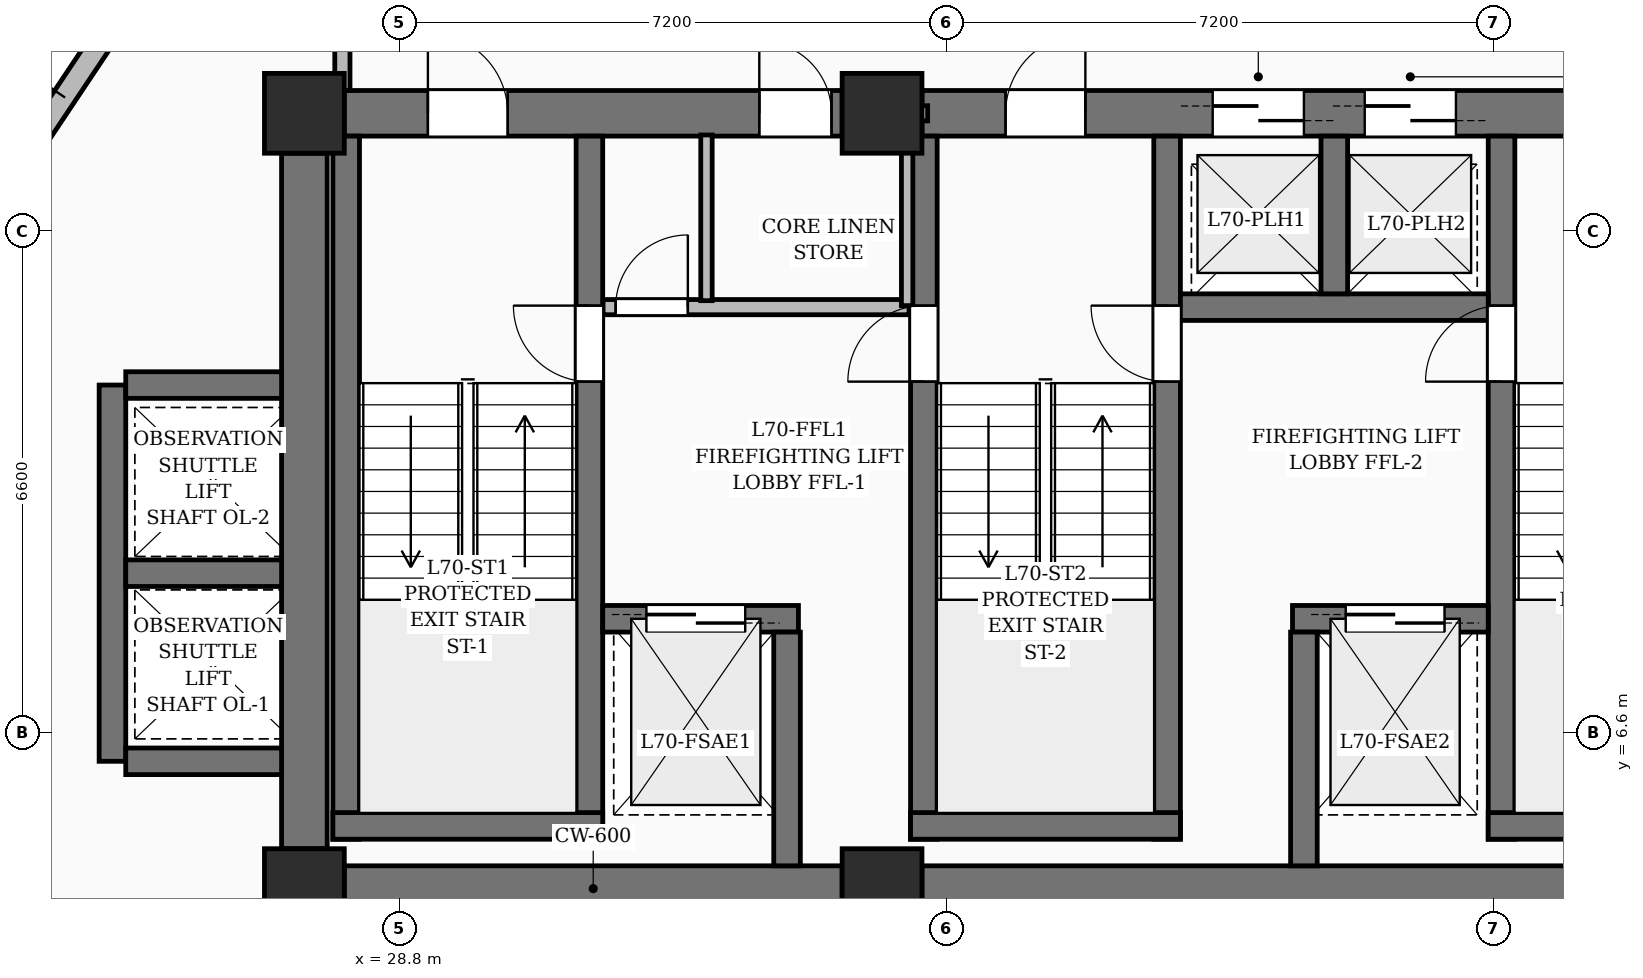
"""IFC4 building model, lengths in metres.
Left out: names, types, materials, properties, quantities, classifications, styles, units other than length and angle.
Written with IfcOpenShell. Run it as: python <this file> out.ifc"""

import sys

from ifc_helpers import new_model, si_unit, direction, frame, frame_2d, origin, origin_2d, place, context, subcontext, project, spatial, rectangle, extrude, element, fill, save


model = new_model("IFC4")
c1 = context("Model", 3, precision=1e-05, world=origin(), true_north=direction((0.0, 1.0)))
c2 = subcontext(c1, "Body", "Model", "MODEL_VIEW")
j1 = project(units=[si_unit("LENGTHUNIT", "METRE"), si_unit("PLANEANGLEUNIT", "RADIAN")], contexts=[c1])
p1 = place(None, origin())
s1 = spatial("IfcSite", under=j1, at=p1, CompositionType="ELEMENT")
p2 = place(p1, origin())
s2 = spatial("IfcBuilding", under=s1, at=p2, CompositionType="ELEMENT")
p3 = place(p2, frame((0.0, 0.0, 270.75)))
s3 = spatial("IfcBuildingStorey", under=s2, at=p3, CompositionType="ELEMENT", Elevation=270.75)
for number, where, z_axis, x_axis in (
    (1, (27.55, 4.55, 0.0), (0.0, 0.0, 1.0), (1.0, 0.0, 0.0)),
    (2, (35.15, 4.55, 0.0), (0.0, 0.0, 1.0), (1.0, 0.0, 0.0)),
    (3, (27.55, 14.75, 0.0), (0.0, 0.0, 1.0), (1.0, 0.0, 0.0)),
    (4, (35.15, 14.75, 0.0), (0.0, 0.0, 1.0), (1.0, 0.0, 0.0)),
):
    element("IfcColumn", number, at=place(p3, frame(where, z_axis=z_axis, x_axis=x_axis)), inside=s3, PredefinedType="COLUMN", context=c2, shape_type="SweptSolid", body=[
        extrude(rectangle(XDim=1.05, YDim=1.05, at=origin_2d()), origin(), (0.0, 0.0, 1.0), 3.75),
    ])
p4 = place(p3, frame((28.075, 4.55, 0.0), z_axis=(0.0, 0.0, 1.0), x_axis=(1.0, 0.0, 0.0)))
e5 = element("IfcWall", 5, at=p4, inside=s3, PredefinedType="SHEAR", context=c2, shape_type="SweptSolid", body=[
    extrude(rectangle(XDim=6.55, YDim=0.6, at=frame_2d((3.275, 0.0))), origin(), (0.0, 0.0, 1.0), 3.75),
])
p5 = place(p3, frame((35.675, 4.55, 0.0), z_axis=(0.0, 0.0, 1.0), x_axis=(1.0, 0.0, 0.0)))
e6 = element("IfcWall", 6, at=p5, inside=s3, PredefinedType="SHEAR", context=c2, shape_type="SweptSolid", body=[
    extrude(rectangle(XDim=10.85, YDim=0.6, at=frame_2d((5.425, 0.0))), origin(), (0.0, 0.0, 1.0), 3.75),
])
p6 = place(p3, frame((28.075, 14.75, 0.0), z_axis=(0.0, 0.0, 1.0), x_axis=(1.0, 0.0, 0.0)))
e7 = element("IfcWall", 7, at=p6, inside=s3, PredefinedType="SHEAR", context=c2, shape_type="SweptSolid", body=[
    extrude(rectangle(XDim=6.55, YDim=0.6, at=frame_2d((3.275, 0.0))), origin(), (0.0, 0.0, 1.0), 3.75),
])
p7 = place(p6, frame((1.1, 0.0, 0.0)))
e8 = element("IfcOpeningElement", 8, at=p7, cuts=e7, PredefinedType="OPENING", context=c2, shape_type="SweptSolid", body=[
    extrude(rectangle(XDim=1.05, YDim=2.15, at=frame_2d((0.525, 1.075))), frame((0.0, 0.31, 0.0), z_axis=(0.0, -1.0, 0.0), x_axis=(1.0, 0.0, 0.0)), (0.0, 0.0, 1.0), 0.62),
])
p8 = place(p6, frame((5.46, 0.0, 0.0)))
e9 = element("IfcOpeningElement", 9, at=p8, cuts=e7, PredefinedType="OPENING", context=c2, shape_type="SweptSolid", body=[
    extrude(rectangle(XDim=0.95, YDim=2.15, at=frame_2d((0.475, 1.075))), frame((0.0, 0.31, 0.0), z_axis=(0.0, -1.0, 0.0), x_axis=(1.0, 0.0, 0.0)), (0.0, 0.0, 1.0), 0.62),
])
p9 = place(p3, frame((35.675, 14.75, 0.0), z_axis=(0.0, 0.0, 1.0), x_axis=(1.0, 0.0, 0.0)))
e10 = element("IfcWall", 10, at=p9, inside=s3, PredefinedType="SHEAR", context=c2, shape_type="SweptSolid", body=[
    extrude(rectangle(XDim=10.85, YDim=0.6, at=frame_2d((5.425, 0.0))), origin(), (0.0, 0.0, 1.0), 3.75),
])
p10 = place(p9, frame((1.1, 0.0, 0.0)))
e11 = element("IfcOpeningElement", 11, at=p10, cuts=e10, PredefinedType="OPENING", context=c2, shape_type="SweptSolid", body=[
    extrude(rectangle(XDim=1.05, YDim=2.15, at=frame_2d((0.525, 1.075))), frame((0.0, 0.31, 0.0), z_axis=(0.0, -1.0, 0.0), x_axis=(1.0, 0.0, 0.0)), (0.0, 0.0, 1.0), 0.62),
])
p11 = place(p9, frame((8.7, 0.0, 0.0)))
e12 = element("IfcOpeningElement", 12, at=p11, cuts=e10, PredefinedType="OPENING", context=c2, shape_type="SweptSolid", body=[
    extrude(rectangle(XDim=1.05, YDim=2.15, at=frame_2d((0.525, 1.075))), frame((0.0, 0.31, 0.0), z_axis=(0.0, -1.0, 0.0), x_axis=(1.0, 0.0, 0.0)), (0.0, 0.0, 1.0), 0.62),
])
p12 = place(p9, frame((3.825, 0.0, 0.0)))
e13 = element("IfcOpeningElement", 13, at=p12, cuts=e10, PredefinedType="OPENING", context=c2, shape_type="SweptSolid", body=[
    extrude(rectangle(XDim=1.2, YDim=2.2, at=frame_2d((0.6, 1.1))), frame((0.0, 0.31, 0.0), z_axis=(0.0, -1.0, 0.0), x_axis=(1.0, 0.0, 0.0)), (0.0, 0.0, 1.0), 0.62),
])
p13 = place(p9, frame((5.825, 0.0, 0.0)))
e14 = element("IfcOpeningElement", 14, at=p13, cuts=e10, PredefinedType="OPENING", context=c2, shape_type="SweptSolid", body=[
    extrude(rectangle(XDim=1.2, YDim=2.2, at=frame_2d((0.6, 1.1))), frame((0.0, 0.31, 0.0), z_axis=(0.0, -1.0, 0.0), x_axis=(1.0, 0.0, 0.0)), (0.0, 0.0, 1.0), 0.62),
])
p14 = place(p3, frame((27.55, 5.075, 0.0), z_axis=(0.0, 0.0, 1.0), x_axis=(0.0, 1.0, 0.0)))
e15 = element("IfcWall", 15, at=p14, inside=s3, PredefinedType="SHEAR", context=c2, shape_type="SweptSolid", body=[
    extrude(rectangle(XDim=9.15, YDim=0.6, at=frame_2d((4.575, 0.0))), origin(), (0.0, 0.0, 1.0), 3.75),
])
p15 = place(p3, frame((28.1, 5.2, 0.0), z_axis=(0.0, 0.0, 1.0), x_axis=(0.0, 1.0, 0.0)))
e16 = element("IfcWall", 16, at=p15, inside=s3, PredefinedType="SOLIDWALL", context=c2, shape_type="SweptSolid", body=[
    extrude(rectangle(XDim=9.25, YDim=0.35, at=frame_2d((4.625, 0.0))), origin(), (0.0, 0.0, 1.0), 3.75),
])
p16 = place(p3, frame((31.3, 5.2, 0.0), z_axis=(0.0, 0.0, 1.0), x_axis=(0.0, 1.0, 0.0)))
e17 = element("IfcWall", 17, at=p16, inside=s3, PredefinedType="SOLIDWALL", context=c2, shape_type="SweptSolid", body=[
    extrude(rectangle(XDim=9.25, YDim=0.35, at=frame_2d((4.625, 0.0))), origin(), (0.0, 0.0, 1.0), 3.75),
])
p17 = place(p16, frame((6.02, 0.0, 0.0)))
e18 = element("IfcOpeningElement", 18, at=p17, cuts=e17, PredefinedType="OPENING", context=c2, shape_type="SweptSolid", body=[
    extrude(rectangle(XDim=1.0, YDim=2.15, at=frame_2d((0.5, 1.075))), frame((0.0, 0.185, 0.0), z_axis=(0.0, -1.0, 0.0), x_axis=(1.0, 0.0, 0.0)), (0.0, 0.0, 1.0), 0.37),
])
p18 = place(p3, frame((27.925, 5.375, 0.0), z_axis=(0.0, 0.0, 1.0), x_axis=(1.0, 0.0, 0.0)))
e19 = element("IfcWall", 19, at=p18, inside=s3, PredefinedType="SOLIDWALL", context=c2, shape_type="SweptSolid", body=[
    extrude(rectangle(XDim=3.55, YDim=0.35, at=frame_2d((1.775, 0.0))), origin(), (0.0, 0.0, 1.0), 3.75),
])
p19 = place(p3, frame((35.7, 5.2, 0.0), z_axis=(0.0, 0.0, 1.0), x_axis=(0.0, 1.0, 0.0)))
e20 = element("IfcWall", 20, at=p19, inside=s3, PredefinedType="SOLIDWALL", context=c2, shape_type="SweptSolid", body=[
    extrude(rectangle(XDim=9.25, YDim=0.35, at=frame_2d((4.625, 0.0))), origin(), (0.0, 0.0, 1.0), 3.75),
])
p20 = place(p19, frame((6.02, 0.0, 0.0)))
e21 = element("IfcOpeningElement", 21, at=p20, cuts=e20, PredefinedType="OPENING", context=c2, shape_type="SweptSolid", body=[
    extrude(rectangle(XDim=1.0, YDim=2.15, at=frame_2d((0.5, 1.075))), frame((0.0, 0.185, 0.0), z_axis=(0.0, -1.0, 0.0), x_axis=(1.0, 0.0, 0.0)), (0.0, 0.0, 1.0), 0.37),
])
p21 = place(p3, frame((38.9, 5.2, 0.0), z_axis=(0.0, 0.0, 1.0), x_axis=(0.0, 1.0, 0.0)))
e22 = element("IfcWall", 22, at=p21, inside=s3, PredefinedType="SOLIDWALL", context=c2, shape_type="SweptSolid", body=[
    extrude(rectangle(XDim=9.25, YDim=0.35, at=frame_2d((4.625, 0.0))), origin(), (0.0, 0.0, 1.0), 3.75),
])
p22 = place(p21, frame((6.02, 0.0, 0.0)))
e23 = element("IfcOpeningElement", 23, at=p22, cuts=e22, PredefinedType="OPENING", context=c2, shape_type="SweptSolid", body=[
    extrude(rectangle(XDim=1.0, YDim=2.15, at=frame_2d((0.5, 1.075))), frame((0.0, 0.185, 0.0), z_axis=(0.0, -1.0, 0.0), x_axis=(1.0, 0.0, 0.0)), (0.0, 0.0, 1.0), 0.37),
])
p23 = place(p3, frame((35.525, 5.375, 0.0), z_axis=(0.0, 0.0, 1.0), x_axis=(1.0, 0.0, 0.0)))
e24 = element("IfcWall", 24, at=p23, inside=s3, PredefinedType="SOLIDWALL", context=c2, shape_type="SweptSolid", body=[
    extrude(rectangle(XDim=3.55, YDim=0.35, at=frame_2d((1.775, 0.0))), origin(), (0.0, 0.0, 1.0), 3.75),
])
p24 = place(p3, frame((43.3, 5.2, 0.0), z_axis=(0.0, 0.0, 1.0), x_axis=(0.0, 1.0, 0.0)))
e25 = element("IfcWall", 25, at=p24, inside=s3, PredefinedType="SOLIDWALL", context=c2, shape_type="SweptSolid", body=[
    extrude(rectangle(XDim=9.25, YDim=0.35, at=frame_2d((4.625, 0.0))), origin(), (0.0, 0.0, 1.0), 3.75),
])
p25 = place(p24, frame((6.02, 0.0, 0.0)))
e26 = element("IfcOpeningElement", 26, at=p25, cuts=e25, PredefinedType="OPENING", context=c2, shape_type="SweptSolid", body=[
    extrude(rectangle(XDim=1.0, YDim=2.15, at=frame_2d((0.5, 1.075))), frame((0.0, 0.185, 0.0), z_axis=(0.0, -1.0, 0.0), x_axis=(1.0, 0.0, 0.0)), (0.0, 0.0, 1.0), 0.37),
])
p26 = place(p3, frame((43.125, 5.375, 0.0), z_axis=(0.0, 0.0, 1.0), x_axis=(1.0, 0.0, 0.0)))
e27 = element("IfcWall", 27, at=p26, inside=s3, PredefinedType="SOLIDWALL", context=c2, shape_type="SweptSolid", body=[
    extrude(rectangle(XDim=3.55, YDim=0.35, at=frame_2d((1.775, 0.0))), origin(), (0.0, 0.0, 1.0), 3.75),
])
p27 = place(p3, frame((31.475, 8.1, 0.0), z_axis=(0.0, 0.0, 1.0), x_axis=(1.0, 0.0, 0.0)))
e28 = element("IfcWall", 28, at=p27, inside=s3, PredefinedType="SOLIDWALL", context=c2, shape_type="SweptSolid", body=[
    extrude(rectangle(XDim=2.575, YDim=0.35, at=frame_2d((1.288, 0.0))), origin(), (0.0, 0.0, 1.0), 3.75),
])
p28 = place(p27, frame((0.575, 0.0, 0.0)))
e29 = element("IfcOpeningElement", 29, at=p28, cuts=e28, PredefinedType="OPENING", context=c2, shape_type="SweptSolid", body=[
    extrude(rectangle(XDim=1.3, YDim=2.25, at=frame_2d((0.65, 1.125))), frame((0.0, 0.185, 0.0), z_axis=(0.0, -1.0, 0.0), x_axis=(1.0, 0.0, 0.0)), (0.0, 0.0, 1.0), 0.37),
])
p29 = place(p3, frame((40.55, 8.1, 0.0), z_axis=(0.0, 0.0, 1.0), x_axis=(1.0, 0.0, 0.0)))
e30 = element("IfcWall", 30, at=p29, inside=s3, PredefinedType="SOLIDWALL", context=c2, shape_type="SweptSolid", body=[
    extrude(rectangle(XDim=2.575, YDim=0.35, at=frame_2d((1.288, 0.0))), origin(), (0.0, 0.0, 1.0), 3.75),
])
p30 = place(p29, frame((0.7, 0.0, 0.0)))
e31 = element("IfcOpeningElement", 31, at=p30, cuts=e30, PredefinedType="OPENING", context=c2, shape_type="SweptSolid", body=[
    extrude(rectangle(XDim=1.3, YDim=2.25, at=frame_2d((0.65, 1.125))), frame((0.0, 0.185, 0.0), z_axis=(0.0, -1.0, 0.0), x_axis=(1.0, 0.0, 0.0)), (0.0, 0.0, 1.0), 0.37),
])
for number, where, z_axis, x_axis in (
    (32, (33.9, 4.85, 0.0), (0.0, 0.0, 1.0), (0.0, 1.0, 0.0)),
    (33, (40.7, 4.85, 0.0), (0.0, 0.0, 1.0), (0.0, 1.0, 0.0)),
):
    element("IfcWall", number, at=place(p3, frame(where, z_axis=z_axis, x_axis=x_axis)), inside=s3, PredefinedType="SOLIDWALL", context=c2, shape_type="SweptSolid", body=[
        extrude(rectangle(XDim=3.075, YDim=0.35, at=frame_2d((1.538, 0.0))), origin(), (0.0, 0.0, 1.0), 3.75),
    ])
p31 = place(p3, frame((39.075, 12.2, 0.0), z_axis=(0.0, 0.0, 1.0), x_axis=(1.0, 0.0, 0.0)))
e34 = element("IfcWall", 34, at=p31, inside=s3, PredefinedType="SOLIDWALL", context=c2, shape_type="SweptSolid", body=[
    extrude(rectangle(XDim=4.05, YDim=0.35, at=frame_2d((2.025, 0.0))), origin(), (0.0, 0.0, 1.0), 3.75),
])
p32 = place(p3, frame((41.1, 12.375, 0.0), z_axis=(0.0, 0.0, 1.0), x_axis=(0.0, 1.0, 0.0)))
e35 = element("IfcWall", 35, at=p32, inside=s3, PredefinedType="SOLIDWALL", context=c2, shape_type="SweptSolid", body=[
    extrude(rectangle(XDim=2.075, YDim=0.35, at=frame_2d((1.038, 0.0))), origin(), (0.0, 0.0, 1.0), 3.75),
])
p33 = place(p3, frame((25.025, 6.225, 0.0), z_axis=(0.0, 0.0, 1.0), x_axis=(0.0, 1.0, 0.0)))
e36 = element("IfcWall", 36, at=p33, inside=s3, PredefinedType="SOLIDWALL", context=c2, shape_type="SweptSolid", body=[
    extrude(rectangle(XDim=4.95, YDim=0.35, at=frame_2d((2.475, 0.0))), origin(), (0.0, 0.0, 1.0), 3.75),
])
for number, where, z_axis, x_axis in (
    (37, (25.2, 6.225, 0.0), (0.0, 0.0, 1.0), (1.0, 0.0, 0.0)),
    (38, (25.2, 8.7, 0.0), (0.0, 0.0, 1.0), (1.0, 0.0, 0.0)),
    (39, (25.2, 11.175, 0.0), (0.0, 0.0, 1.0), (1.0, 0.0, 0.0)),
):
    element("IfcWall", number, at=place(p3, frame(where, z_axis=z_axis, x_axis=x_axis)), inside=s3, PredefinedType="SOLIDWALL", context=c2, shape_type="SweptSolid", body=[
        extrude(rectangle(XDim=2.05, YDim=0.35, at=frame_2d((1.025, 0.0))), origin(), (0.0, 0.0, 1.0), 3.75),
    ])
p34 = place(p3, frame((21.812, 11.105, 0.0), z_axis=(0.0, 0.0, 1.0), x_axis=(0.555222871335, 0.831701607036, 0.0)))
e40 = element("IfcWall", 40, at=p34, inside=s3, PredefinedType="SOLIDWALL", context=c2, shape_type="SweptSolid", body=[
    extrude(rectangle(XDim=7.328, YDim=0.3, at=frame_2d((3.664, 0.0))), origin(), (0.0, 0.0, 1.0), 3.5),
])
p35 = place(p34, frame((1.428, 0.0, 0.0)))
e41 = element("IfcOpeningElement", 41, at=p35, cuts=e40, PredefinedType="OPENING", context=c2, shape_type="SweptSolid", body=[
    extrude(rectangle(XDim=1.0, YDim=2.2, at=frame_2d((0.5, 1.1))), frame((0.0, 0.16, 0.0), z_axis=(0.0, -1.0, 0.0), x_axis=(1.0, 0.0, 0.0)), (0.0, 0.0, 1.0), 0.32),
])
p36 = place(p3, frame((34.72, 14.75, 0.0), z_axis=(0.0, 0.0, 1.0), x_axis=(1.0, 0.0, 0.0)))
e42 = element("IfcWall", 42, at=p36, inside=s3, PredefinedType="PARTITIONING", context=c2, shape_type="SweptSolid", body=[
    extrude(rectangle(XDim=1.03, YDim=0.2, at=frame_2d((0.515, 0.0))), origin(), (0.0, 0.0, 1.0), 2.685),
])
p37 = place(p3, frame((31.48, 12.2, 0.0), z_axis=(0.0, 0.0, 1.0), x_axis=(1.0, 0.0, 0.0)))
e43 = element("IfcWall", 43, at=p37, inside=s3, PredefinedType="PARTITIONING", context=c2, shape_type="SweptSolid", body=[
    extrude(rectangle(XDim=4.025, YDim=0.2, at=frame_2d((2.012, 0.0))), origin(), (0.0, 0.0, 1.0), 3.5),
])
p38 = place(p37, frame((0.165, 0.0, 0.0)))
e44 = element("IfcOpeningElement", 44, at=p38, cuts=e43, PredefinedType="OPENING", context=c2, shape_type="SweptSolid", body=[
    extrude(rectangle(XDim=0.95, YDim=2.15, at=frame_2d((0.475, 1.075))), frame((0.0, 0.11, 0.0), z_axis=(0.0, -1.0, 0.0), x_axis=(1.0, 0.0, 0.0)), (0.0, 0.0, 1.0), 0.22),
])
p39 = place(p3, frame((32.84, 12.285, 0.0), z_axis=(0.0, 0.0, 1.0), x_axis=(0.0, 1.0, 0.0)))
e45 = element("IfcWall", 45, at=p39, inside=s3, PredefinedType="PARTITIONING", context=c2, shape_type="SweptSolid", body=[
    extrude(rectangle(XDim=2.18, YDim=0.15, at=frame_2d((1.09, 0.0))), origin(), (0.0, 0.0, 1.0), 2.685),
])
p40 = place(p3, frame((35.48, 12.22, 0.0), z_axis=(0.0, 0.0, 1.0), x_axis=(0.0, 1.0, 0.0)))
e46 = element("IfcWall", 46, at=p40, inside=s3, PredefinedType="PARTITIONING", context=c2, shape_type="SweptSolid", body=[
    extrude(rectangle(XDim=2.396, YDim=0.15, at=frame_2d((1.198, 0.0))), origin(), (0.0, 0.0, 1.0), 3.5),
])
p41 = place(p3, frame((28.05, 17.265, 0.0), z_axis=(0.0, 0.0, 1.0), x_axis=(0.0, -1.0, 0.0)))
e47 = element("IfcWall", 47, at=p41, inside=s3, PredefinedType="PARTITIONING", context=c2, shape_type="SweptSolid", body=[
    extrude(rectangle(XDim=2.215, YDim=0.2, at=frame_2d((1.107, 0.0))), origin(), (0.0, 0.0, 1.0), 3.5),
])
p42 = place(p7, origin())
e48 = element("IfcDoor", 48, at=p42, inside=s3, OperationType="SINGLE_SWING_LEFT", PredefinedType="DOOR", context=c2, shape_type="SweptSolid", body=[
    extrude(rectangle(XDim=1.05, YDim=2.15, at=frame_2d((0.525, 1.075))), frame((0.0, 0.025, 0.0), z_axis=(0.0, -1.0, 0.0), x_axis=(1.0, 0.0, 0.0)), (0.0, 0.0, 1.0), 0.05),
])
fill(e8, e48)
p43 = place(p10, origin())
e49 = element("IfcDoor", 49, at=p43, inside=s3, OperationType="SINGLE_SWING_RIGHT", PredefinedType="DOOR", context=c2, shape_type="SweptSolid", body=[
    extrude(rectangle(XDim=1.05, YDim=2.15, at=frame_2d((0.525, 1.075))), frame((0.0, 0.025, 0.0), z_axis=(0.0, -1.0, 0.0), x_axis=(1.0, 0.0, 0.0)), (0.0, 0.0, 1.0), 0.05),
])
fill(e11, e49)
p44 = place(p17, origin())
e50 = element("IfcDoor", 50, at=p44, inside=s3, OperationType="SINGLE_SWING_RIGHT", PredefinedType="DOOR", context=c2, shape_type="SweptSolid", body=[
    extrude(rectangle(XDim=1.0, YDim=2.15, at=frame_2d((0.5, 1.075))), frame((0.0, 0.025, 0.0), z_axis=(0.0, -1.0, 0.0), x_axis=(1.0, 0.0, 0.0)), (0.0, 0.0, 1.0), 0.05),
])
fill(e18, e50)
p45 = place(p20, origin())
e51 = element("IfcDoor", 51, at=p45, inside=s3, OperationType="SINGLE_SWING_LEFT", PredefinedType="DOOR", context=c2, shape_type="SweptSolid", body=[
    extrude(rectangle(XDim=1.0, YDim=2.15, at=frame_2d((0.5, 1.075))), frame((0.0, 0.025, 0.0), z_axis=(0.0, -1.0, 0.0), x_axis=(1.0, 0.0, 0.0)), (0.0, 0.0, 1.0), 0.05),
])
fill(e21, e51)
p46 = place(p22, origin())
e52 = element("IfcDoor", 52, at=p46, inside=s3, OperationType="SINGLE_SWING_RIGHT", PredefinedType="DOOR", context=c2, shape_type="SweptSolid", body=[
    extrude(rectangle(XDim=1.0, YDim=2.15, at=frame_2d((0.5, 1.075))), frame((0.0, 0.025, 0.0), z_axis=(0.0, -1.0, 0.0), x_axis=(1.0, 0.0, 0.0)), (0.0, 0.0, 1.0), 0.05),
])
fill(e23, e52)
p47 = place(p25, origin())
e53 = element("IfcDoor", 53, at=p47, inside=s3, OperationType="SINGLE_SWING_LEFT", PredefinedType="DOOR", context=c2, shape_type="SweptSolid", body=[
    extrude(rectangle(XDim=1.0, YDim=2.15, at=frame_2d((0.5, 1.075))), frame((0.0, 0.025, 0.0), z_axis=(0.0, -1.0, 0.0), x_axis=(1.0, 0.0, 0.0)), (0.0, 0.0, 1.0), 0.05),
])
fill(e26, e53)
p48 = place(p28, origin())
e54 = element("IfcDoor", 54, at=p48, inside=s3, OperationType="DOUBLE_DOOR_SLIDING", PredefinedType="DOOR", context=c2, shape_type="SweptSolid", body=[
    extrude(rectangle(XDim=1.3, YDim=2.25, at=frame_2d((0.65, 1.125))), frame((0.0, 0.025, 0.0), z_axis=(0.0, -1.0, 0.0), x_axis=(1.0, 0.0, 0.0)), (0.0, 0.0, 1.0), 0.05),
])
fill(e29, e54)
p49 = place(p30, origin())
e55 = element("IfcDoor", 55, at=p49, inside=s3, OperationType="DOUBLE_DOOR_SLIDING", PredefinedType="DOOR", context=c2, shape_type="SweptSolid", body=[
    extrude(rectangle(XDim=1.3, YDim=2.25, at=frame_2d((0.65, 1.125))), frame((0.0, 0.025, 0.0), z_axis=(0.0, -1.0, 0.0), x_axis=(1.0, 0.0, 0.0)), (0.0, 0.0, 1.0), 0.05),
])
fill(e31, e55)
p50 = place(p12, origin())
e56 = element("IfcDoor", 56, at=p50, inside=s3, OperationType="DOUBLE_DOOR_SLIDING", PredefinedType="DOOR", context=c2, shape_type="SweptSolid", body=[
    extrude(rectangle(XDim=1.2, YDim=2.2, at=frame_2d((0.6, 1.1))), frame((0.0, 0.025, 0.0), z_axis=(0.0, -1.0, 0.0), x_axis=(1.0, 0.0, 0.0)), (0.0, 0.0, 1.0), 0.05),
])
fill(e13, e56)
p51 = place(p13, origin())
e57 = element("IfcDoor", 57, at=p51, inside=s3, OperationType="DOUBLE_DOOR_SLIDING", PredefinedType="DOOR", context=c2, shape_type="SweptSolid", body=[
    extrude(rectangle(XDim=1.2, YDim=2.2, at=frame_2d((0.6, 1.1))), frame((0.0, 0.025, 0.0), z_axis=(0.0, -1.0, 0.0), x_axis=(1.0, 0.0, 0.0)), (0.0, 0.0, 1.0), 0.05),
])
fill(e14, e57)
p52 = place(p38, origin())
e58 = element("IfcDoor", 58, at=p52, inside=s3, OperationType="SINGLE_SWING_RIGHT", PredefinedType="DOOR", context=c2, shape_type="SweptSolid", body=[
    extrude(rectangle(XDim=0.95, YDim=2.15, at=frame_2d((0.475, 1.075))), frame((0.0, 0.025, 0.0), z_axis=(0.0, -1.0, 0.0), x_axis=(1.0, 0.0, 0.0)), (0.0, 0.0, 1.0), 0.05),
])
fill(e44, e58)
p53 = place(p8, origin())
e59 = element("IfcDoor", 59, at=p53, inside=s3, OperationType="SINGLE_SWING_LEFT", PredefinedType="DOOR", context=c2, shape_type="SweptSolid", body=[
    extrude(rectangle(XDim=0.95, YDim=2.15, at=frame_2d((0.475, 1.075))), frame((0.0, 0.025, 0.0), z_axis=(0.0, -1.0, 0.0), x_axis=(1.0, 0.0, 0.0)), (0.0, 0.0, 1.0), 0.05),
])
fill(e9, e59)
save(model, sys.argv[1])
